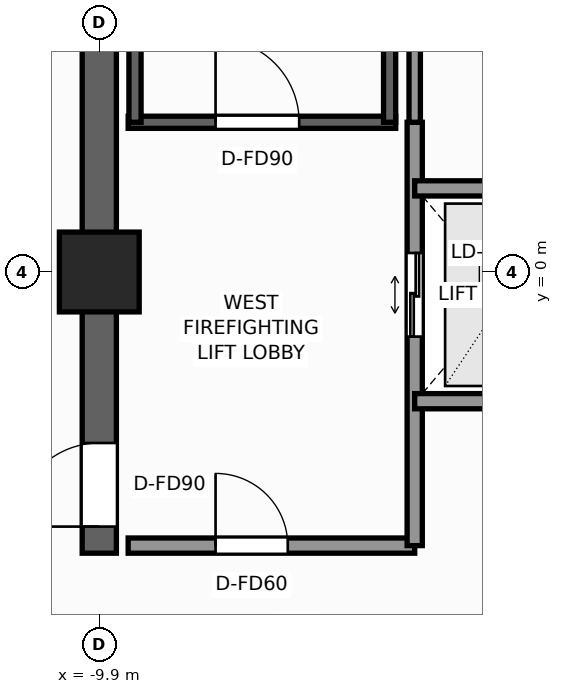
"""IFC4 building model, lengths in metres.
Left out: names, types, materials, properties, quantities, classifications, styles, units other than length and angle.
Written with IfcOpenShell. Run it as: python <this file> out.ifc"""

import sys

from ifc_helpers import new_model, si_unit, direction, frame, frame_2d, origin, origin_2d, place, context, subcontext, project, spatial, rectangle, extrude, element, fill, save


model = new_model("IFC4")
c1 = context("Model", 3, precision=1e-05, world=origin(), true_north=direction((0.0, 1.0)))
c2 = subcontext(c1, "Body", "Model", "MODEL_VIEW")
j1 = project(units=[si_unit("LENGTHUNIT", "METRE"), si_unit("PLANEANGLEUNIT", "RADIAN")], contexts=[c1])
p1 = place(None, origin())
s1 = spatial("IfcSite", under=j1, at=p1, CompositionType="ELEMENT")
p2 = place(p1, origin())
s2 = spatial("IfcBuilding", under=s1, at=p2, CompositionType="ELEMENT")
p3 = place(p2, frame((0.0, 0.0, 251.4)))
s3 = spatial("IfcBuildingStorey", under=s2, at=p3, CompositionType="ELEMENT", Elevation=251.4)
p4 = place(p3, frame((-9.9, -3.7, 0.0), z_axis=(0.0, 0.0, 1.0), x_axis=(0.0, 1.0, 0.0)))
e1 = element("IfcWall", 1, at=p4, inside=s3, PredefinedType="SHEAR", context=c2, shape_type="SweptSolid", body=[
    extrude(rectangle(XDim=13.375, YDim=0.45, at=frame_2d((6.688, 0.0))), origin(), (0.0, 0.0, 1.0), 3.5),
])
p5 = place(p4, frame((0.35, 0.0, 0.0)))
e2 = element("IfcOpeningElement", 2, at=p5, cuts=e1, PredefinedType="OPENING", context=c2, shape_type="SweptSolid", body=[
    extrude(rectangle(XDim=1.1, YDim=2.2, at=frame_2d((0.55, 1.1))), frame((0.0, 0.235, 0.0), z_axis=(0.0, -1.0, 0.0), x_axis=(1.0, 0.0, 0.0)), (0.0, 0.0, 1.0), 0.47),
])
p6 = place(p3, frame((-9.9, 0.0, 0.0), z_axis=(0.0, 0.0, 1.0), x_axis=(1.0, 0.0, 0.0)))
e3 = element("IfcColumn", 3, at=p6, inside=s3, PredefinedType="COLUMN", context=c2, shape_type="SweptSolid", body=[
    extrude(rectangle(XDim=1.05, YDim=1.05, at=origin_2d()), origin(), (0.0, 0.0, 1.0), 3.5),
])
p7 = place(p3, frame((-9.52, 1.97, 0.0), z_axis=(0.0, 0.0, 1.0), x_axis=(1.0, 0.0, 0.0)))
e4 = element("IfcWall", 4, at=p7, inside=s3, PredefinedType="SHEAR", context=c2, shape_type="SweptSolid", body=[
    extrude(rectangle(XDim=3.52, YDim=0.16, at=frame_2d((1.76, 0.0))), origin(), (0.0, 0.0, 1.0), 3.5),
])
p8 = place(p7, frame((1.15, 0.0, 0.0)))
e5 = element("IfcOpeningElement", 5, at=p8, cuts=e4, PredefinedType="OPENING", context=c2, shape_type="SweptSolid", body=[
    extrude(rectangle(XDim=1.1, YDim=2.2, at=frame_2d((0.55, 1.1))), frame((0.0, 0.09, 0.0), z_axis=(0.0, -1.0, 0.0), x_axis=(1.0, 0.0, 0.0)), (0.0, 0.0, 1.0), 0.18),
])
for number, where, z_axis, x_axis in (
    (6, (-9.43, 1.97, 0.0), (0.0, 0.0, 1.0), (0.0, 1.0, 0.0)),
    (7, (-6.08, 1.97, 0.0), (0.0, 0.0, 1.0), (0.0, 1.0, 0.0)),
):
    element("IfcWall", number, at=place(p3, frame(where, z_axis=z_axis, x_axis=x_axis)), inside=s3, PredefinedType="SHEAR", context=c2, shape_type="SweptSolid", body=[
        extrude(rectangle(XDim=7.56, YDim=0.16, at=frame_2d((3.78, 0.0))), origin(), (0.0, 0.0, 1.0), 3.5),
    ])
p9 = place(p3, frame((-9.52, -3.6, 0.0), z_axis=(0.0, 0.0, 1.0), x_axis=(1.0, 0.0, 0.0)))
e8 = element("IfcWall", 8, at=p9, inside=s3, PredefinedType="SOLIDWALL", context=c2, shape_type="SweptSolid", body=[
    extrude(rectangle(XDim=3.77, YDim=0.2, at=frame_2d((1.885, 0.0))), origin(), (0.0, 0.0, 1.0), 3.25),
])
p10 = place(p9, frame((1.15, 0.0, 0.0)))
e9 = element("IfcOpeningElement", 9, at=p10, cuts=e8, PredefinedType="OPENING", context=c2, shape_type="SweptSolid", body=[
    extrude(rectangle(XDim=0.95, YDim=2.06, at=frame_2d((0.475, 1.03))), frame((0.0, 0.11, 0.0), z_axis=(0.0, -1.0, 0.0), x_axis=(1.0, 0.0, 0.0)), (0.0, 0.0, 1.0), 0.22),
])
p11 = place(p3, frame((-5.75, -3.6, 0.0), z_axis=(0.0, 0.0, 1.0), x_axis=(0.0, 1.0, 0.0)))
e10 = element("IfcWall", 10, at=p11, inside=s3, PredefinedType="SOLIDWALL", context=c2, shape_type="SweptSolid", body=[
    extrude(rectangle(XDim=5.57, YDim=0.2, at=frame_2d((2.785, 0.0))), origin(), (0.0, 0.0, 1.0), 3.25),
])
p12 = place(p11, frame((2.75, 0.0, 0.0)))
e11 = element("IfcOpeningElement", 11, at=p12, cuts=e10, PredefinedType="OPENING", context=c2, shape_type="SweptSolid", body=[
    extrude(rectangle(XDim=1.1, YDim=2.2, at=frame_2d((0.55, 1.1))), frame((0.0, 0.11, 0.0), z_axis=(0.0, -1.0, 0.0), x_axis=(1.0, 0.0, 0.0)), (0.0, 0.0, 1.0), 0.22),
])
for number, where, z_axis, x_axis in (
    (12, (-5.75, -1.7, 0.0), (0.0, 0.0, 1.0), (1.0, 0.0, 0.0)),
    (13, (-5.75, 1.1, 0.0), (0.0, 0.0, 1.0), (1.0, 0.0, 0.0)),
):
    element("IfcWall", number, at=place(p3, frame(where, z_axis=z_axis, x_axis=x_axis)), inside=s3, PredefinedType="SOLIDWALL", context=c2, shape_type="SweptSolid", body=[
        extrude(rectangle(XDim=2.4, YDim=0.2, at=frame_2d((1.2, 0.0))), origin(), (0.0, 0.0, 1.0), 3.25),
    ])
p13 = place(p3, frame((-5.75, 1.97, 0.0), z_axis=(0.0, 0.0, 1.0), x_axis=(0.0, 1.0, 0.0)))
e14 = element("IfcWall", 14, at=p13, inside=s3, PredefinedType="PARTITIONING", context=c2, shape_type="SweptSolid", body=[
    extrude(rectangle(XDim=2.33, YDim=0.15, at=frame_2d((1.165, 0.0))), origin(), (0.0, 0.0, 1.0), 3.25),
])
p14 = place(p8, origin())
e15 = element("IfcDoor", 15, at=p14, inside=s3, OperationType="SINGLE_SWING_LEFT", PredefinedType="DOOR", context=c2, shape_type="SweptSolid", body=[
    extrude(rectangle(XDim=1.1, YDim=2.2, at=frame_2d((0.55, 1.1))), frame((0.0, 0.025, 0.0), z_axis=(0.0, -1.0, 0.0), x_axis=(1.0, 0.0, 0.0)), (0.0, 0.0, 1.0), 0.05),
])
fill(e5, e15)
p15 = place(p5, origin())
e16 = element("IfcDoor", 16, at=p15, inside=s3, OperationType="SINGLE_SWING_LEFT", PredefinedType="DOOR", context=c2, shape_type="SweptSolid", body=[
    extrude(rectangle(XDim=1.1, YDim=2.2, at=frame_2d((0.55, 1.1))), frame((0.0, 0.025, 0.0), z_axis=(0.0, -1.0, 0.0), x_axis=(1.0, 0.0, 0.0)), (0.0, 0.0, 1.0), 0.05),
])
fill(e2, e16)
p16 = place(p12, origin())
e17 = element("IfcDoor", 17, at=p16, inside=s3, OperationType="DOUBLE_DOOR_SLIDING", PredefinedType="DOOR", context=c2, shape_type="SweptSolid", body=[
    extrude(rectangle(XDim=1.1, YDim=2.2, at=frame_2d((0.55, 1.1))), frame((0.0, 0.025, 0.0), z_axis=(0.0, -1.0, 0.0), x_axis=(1.0, 0.0, 0.0)), (0.0, 0.0, 1.0), 0.05),
])
fill(e11, e17)
p17 = place(p10, origin())
e18 = element("IfcDoor", 18, at=p17, inside=s3, OperationType="SINGLE_SWING_LEFT", PredefinedType="DOOR", context=c2, shape_type="SweptSolid", body=[
    extrude(rectangle(XDim=0.95, YDim=2.06, at=frame_2d((0.475, 1.03))), frame((0.0, 0.025, 0.0), z_axis=(0.0, -1.0, 0.0), x_axis=(1.0, 0.0, 0.0)), (0.0, 0.0, 1.0), 0.05),
])
fill(e9, e18)
save(model, sys.argv[1])
